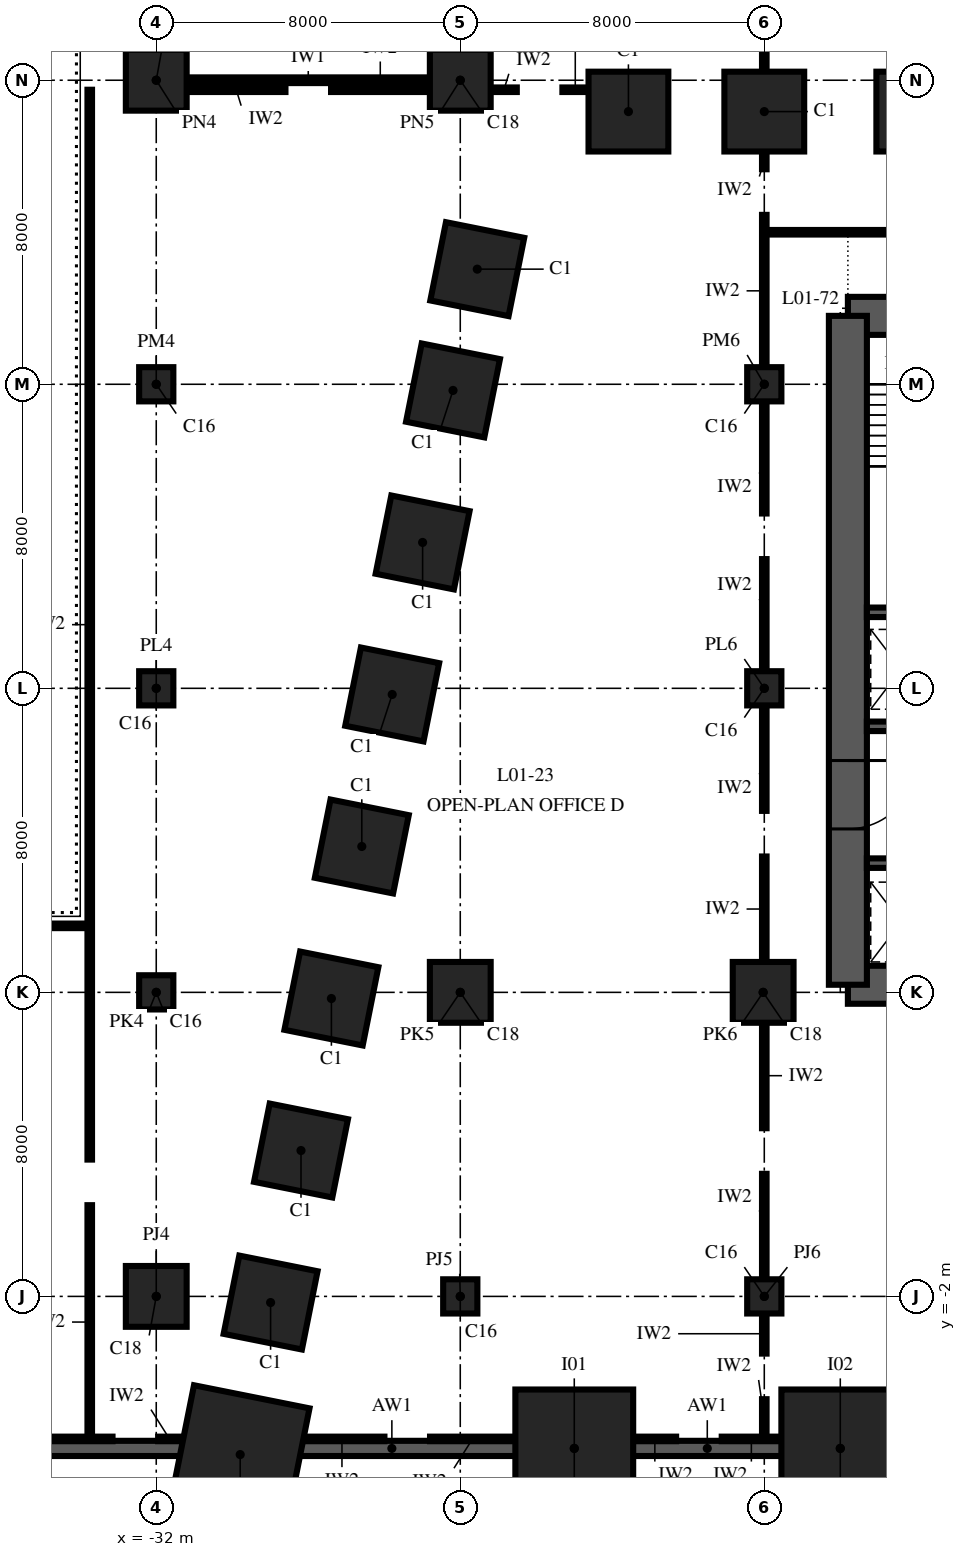
"""IFC4 building model, lengths in metres.
Left out: names, types, materials, properties, quantities, classifications, styles, units other than length and angle.
Written with IfcOpenShell. Run it as: python <this file> out.ifc"""

import sys

from ifc_helpers import new_model, si_unit, direction, frame, frame_2d, origin, origin_2d, place, context, subcontext, project, spatial, polyline, rectangle, outline, extrude, element, fill, save


model = new_model("IFC4")
c1 = context("Model", 3, precision=1e-05, world=origin(), true_north=direction((0.0, 1.0)))
c2 = subcontext(c1, "Body", "Model", "MODEL_VIEW")
j1 = project(units=[si_unit("LENGTHUNIT", "METRE"), si_unit("PLANEANGLEUNIT", "RADIAN")], contexts=[c1])
p1 = place(None, origin())
s1 = spatial("IfcSite", under=j1, at=p1, CompositionType="ELEMENT")
p2 = place(p1, origin())
s2 = spatial("IfcBuilding", under=s1, at=p2, CompositionType="ELEMENT")
p3 = place(p2, frame((0.0, 0.0, 6.0)))
s3 = spatial("IfcBuildingStorey", under=s2, at=p3, CompositionType="ELEMENT", Elevation=6.0)
for number, where, z_axis, x_axis in (
    (1, (-12.0, 29.175, 0.0), (0.0, 0.0, 1.0), (-1.0, 0.0, 0.0)),
    (2, (-16.0, 29.175, 0.0), (0.0, 0.0, 1.0), (-1.0, 0.0, 0.0)),
    (3, (-19.575, 29.175, 0.0), (0.0, 0.0, 1.0), (-1.0, 0.0, 0.0)),
    (4, (-23.553, 25.029, 0.0), (0.0, 0.0, 1.0), (-0.196, -0.981, 0.0)),
    (5, (-24.191, 21.838, 0.0), (0.0, 0.0, 1.0), (-0.196, -0.981, 0.0)),
    (6, (-24.991, 17.838, 0.0), (0.0, 0.0, 1.0), (-0.196, -0.981, 0.0)),
    (7, (-25.791, 13.838, 0.0), (0.0, 0.0, 1.0), (-0.196, -0.981, 0.0)),
    (8, (-26.591, 9.838, 0.0), (0.0, 0.0, 1.0), (-0.196, -0.981, 0.0)),
    (9, (-27.391, 5.838, 0.0), (0.0, 0.0, 1.0), (-0.196, -0.981, 0.0)),
    (10, (-28.191, 1.838, 0.0), (0.0, 0.0, 1.0), (-0.196, -0.981, 0.0)),
    (11, (-28.991, -2.162, 0.0), (0.0, 0.0, 1.0), (-0.196, -0.981, 0.0)),
):
    element("IfcColumn", number, at=place(p3, frame(where, z_axis=z_axis, x_axis=x_axis)), inside=s3, PredefinedType="COLUMN", context=c2, shape_type="SweptSolid", body=[
        extrude(rectangle(XDim=2.1, YDim=2.1, at=origin_2d()), origin(), (0.0, 0.0, 1.0), 6.0),
    ])
for number, where, z_axis, x_axis in (
    (12, (-29.791, -6.162, 0.0), (0.0, 0.0, 1.0), (-0.196, -0.981, 0.0)),
    (13, (-21.0, -6.0, 0.0), (0.0, 0.0, 1.0), (1.0, 0.0, 0.0)),
    (14, (-14.0, -6.0, 0.0), (0.0, 0.0, 1.0), (1.0, 0.0, 0.0)),
):
    element("IfcColumn", number, at=place(p3, frame(where, z_axis=z_axis, x_axis=x_axis)), inside=s3, PredefinedType="COLUMN", context=c2, shape_type="SweptSolid", body=[
        extrude(rectangle(XDim=3.1, YDim=3.1, at=origin_2d()), origin(), (0.0, 0.0, 1.0), 6.0),
    ])
p4 = place(p3, frame((-32.0, -2.0, 0.0), z_axis=(0.0, 0.0, 1.0), x_axis=(1.0, 0.0, 0.0)))
e15 = element("IfcColumn", 15, at=p4, inside=s3, PredefinedType="COLUMN", context=c2, shape_type="SweptSolid", body=[
    extrude(rectangle(XDim=1.6, YDim=1.6, at=origin_2d()), origin(), (0.0, 0.0, 1.0), 6.0),
])
for number, where, z_axis, x_axis in (
    (16, (-32.0, 6.0, 0.0), (0.0, 0.0, 1.0), (1.0, 0.0, 0.0)),
    (17, (-32.0, 14.0, 0.0), (0.0, 0.0, 1.0), (1.0, 0.0, 0.0)),
    (18, (-32.0, 22.0, 0.0), (0.0, 0.0, 1.0), (1.0, 0.0, 0.0)),
):
    element("IfcColumn", number, at=place(p3, frame(where, z_axis=z_axis, x_axis=x_axis)), inside=s3, PredefinedType="COLUMN", context=c2, shape_type="SweptSolid", body=[
        extrude(rectangle(XDim=0.9, YDim=0.9, at=origin_2d()), origin(), (0.0, 0.0, 1.0), 6.0),
    ])
p5 = place(p3, frame((-32.0, 30.0, 0.0), z_axis=(0.0, 0.0, 1.0), x_axis=(1.0, 0.0, 0.0)))
e19 = element("IfcColumn", 19, at=p5, inside=s3, PredefinedType="COLUMN", context=c2, shape_type="SweptSolid", body=[
    extrude(rectangle(XDim=1.6, YDim=1.6, at=origin_2d()), origin(), (0.0, 0.0, 1.0), 6.0),
])
p6 = place(p3, frame((-24.0, -2.0, 0.0), z_axis=(0.0, 0.0, 1.0), x_axis=(1.0, 0.0, 0.0)))
e20 = element("IfcColumn", 20, at=p6, inside=s3, PredefinedType="COLUMN", context=c2, shape_type="SweptSolid", body=[
    extrude(rectangle(XDim=0.9, YDim=0.9, at=origin_2d()), origin(), (0.0, 0.0, 1.0), 6.0),
])
for number, where, z_axis, x_axis in (
    (21, (-24.0, 6.0, 0.0), (0.0, 0.0, 1.0), (1.0, 0.0, 0.0)),
    (22, (-24.0, 30.0, 0.0), (0.0, 0.0, 1.0), (1.0, 0.0, 0.0)),
):
    element("IfcColumn", number, at=place(p3, frame(where, z_axis=z_axis, x_axis=x_axis)), inside=s3, PredefinedType="COLUMN", context=c2, shape_type="SweptSolid", body=[
        extrude(rectangle(XDim=1.6, YDim=1.6, at=origin_2d()), origin(), (0.0, 0.0, 1.0), 6.0),
    ])
p7 = place(p3, frame((-16.0, -2.0, 0.0), z_axis=(0.0, 0.0, 1.0), x_axis=(1.0, 0.0, 0.0)))
e23 = element("IfcColumn", 23, at=p7, inside=s3, PredefinedType="COLUMN", context=c2, shape_type="SweptSolid", body=[
    extrude(rectangle(XDim=0.9, YDim=0.9, at=origin_2d()), origin(), (0.0, 0.0, 1.0), 6.0),
])
p8 = place(p3, frame((-16.03, 6.0, 0.0), z_axis=(0.0, 0.0, 1.0), x_axis=(1.0, 0.0, 0.0)))
e24 = element("IfcColumn", 24, at=p8, inside=s3, PredefinedType="COLUMN", context=c2, shape_type="SweptSolid", body=[
    extrude(rectangle(XDim=1.6, YDim=1.6, at=origin_2d()), origin(), (0.0, 0.0, 1.0), 6.0),
])
for number, where, z_axis, x_axis in (
    (25, (-16.0, 14.0, 0.0), (0.0, 0.0, 1.0), (1.0, 0.0, 0.0)),
    (26, (-16.0, 22.0, 0.0), (0.0, 0.0, 1.0), (1.0, 0.0, 0.0)),
):
    element("IfcColumn", number, at=place(p3, frame(where, z_axis=z_axis, x_axis=x_axis)), inside=s3, PredefinedType="COLUMN", context=c2, shape_type="SweptSolid", body=[
        extrude(rectangle(XDim=0.9, YDim=0.9, at=origin_2d()), origin(), (0.0, 0.0, 1.0), 6.0),
    ])
p9 = place(p3, frame((-13.8, 6.2, 0.0), z_axis=(0.0, 0.0, 1.0), x_axis=(1.0, 0.0, 0.0)))
e27 = element("IfcWall", 27, at=p9, inside=s3, PredefinedType="SHEAR", context=c2, shape_type="SweptSolid", body=[
    extrude(rectangle(XDim=27.6, YDim=1.0, at=frame_2d((13.8, 0.0))), origin(), (0.0, 0.0, 1.0), 6.0),
])
p10 = place(p3, frame((13.8, 23.8, 0.0), z_axis=(0.0, 0.0, 1.0), x_axis=(-1.0, 0.0, 0.0)))
e28 = element("IfcWall", 28, at=p10, inside=s3, PredefinedType="SHEAR", context=c2, shape_type="SweptSolid", body=[
    extrude(rectangle(XDim=27.6, YDim=1.0, at=frame_2d((13.8, 0.0))), origin(), (0.0, 0.0, 1.0), 6.0),
])
p11 = place(p10, frame((21.7, 0.0, 0.0)))
e29 = element("IfcOpeningElement", 29, at=p11, cuts=e28, PredefinedType="OPENING", context=c2, shape_type="SweptSolid", body=[
    extrude(rectangle(XDim=1.0, YDim=2.1, at=frame_2d((0.5, 1.05))), frame((0.0, 0.515, 0.0), z_axis=(0.0, -1.0, 0.0), x_axis=(1.0, 0.0, 0.0)), (0.0, 0.0, 1.0), 1.03),
])
p12 = place(p10, frame((4.9, 0.0, 0.0)))
e30 = element("IfcOpeningElement", 30, at=p12, cuts=e28, PredefinedType="OPENING", context=c2, shape_type="SweptSolid", body=[
    extrude(rectangle(XDim=1.0, YDim=2.1, at=frame_2d((0.5, 1.05))), frame((0.0, 0.515, 0.0), z_axis=(0.0, -1.0, 0.0), x_axis=(1.0, 0.0, 0.0)), (0.0, 0.0, 1.0), 1.03),
])
p13 = place(p10, frame((17.3, 0.0, 0.0)))
e31 = element("IfcOpeningElement", 31, at=p13, cuts=e28, PredefinedType="OPENING", context=c2, shape_type="SweptSolid", body=[
    extrude(rectangle(XDim=1.0, YDim=2.1, at=frame_2d((0.5, 1.05))), frame((0.0, 0.515, 0.0), z_axis=(0.0, -1.0, 0.0), x_axis=(1.0, 0.0, 0.0)), (0.0, 0.0, 1.0), 1.03),
])
p14 = place(p10, frame((13.3, 0.0, 0.0)))
e32 = element("IfcOpeningElement", 32, at=p14, cuts=e28, PredefinedType="OPENING", context=c2, shape_type="SweptSolid", body=[
    extrude(rectangle(XDim=1.0, YDim=2.1, at=frame_2d((0.5, 1.05))), frame((0.0, 0.515, 0.0), z_axis=(0.0, -1.0, 0.0), x_axis=(1.0, 0.0, 0.0)), (0.0, 0.0, 1.0), 1.03),
])
p15 = place(p10, frame((9.3, 0.0, 0.0)))
e33 = element("IfcOpeningElement", 33, at=p15, cuts=e28, PredefinedType="OPENING", context=c2, shape_type="SweptSolid", body=[
    extrude(rectangle(XDim=1.0, YDim=2.1, at=frame_2d((0.5, 1.05))), frame((0.0, 0.515, 0.0), z_axis=(0.0, -1.0, 0.0), x_axis=(1.0, 0.0, 0.0)), (0.0, 0.0, 1.0), 1.03),
])
p16 = place(p3, frame((-13.8, 23.8, 0.0), z_axis=(0.0, 0.0, 1.0), x_axis=(0.0, -1.0, 0.0)))
e34 = element("IfcWall", 34, at=p16, inside=s3, PredefinedType="SHEAR", context=c2, shape_type="SweptSolid", body=[
    extrude(outline(polyline([(0.0, -0.5), (17.6, -0.5), (17.6, 0.0), (17.1, 0.0), (17.1, 0.5), (0.5, 0.5), (0.5, 0.0), (0.0, 0.0), (0.0, -0.5)])), origin(), (0.0, 0.0, 1.0), 6.0),
])
p17 = place(p16, frame((11.7, 0.0, 0.0)))
e35 = element("IfcOpeningElement", 35, at=p17, cuts=e34, PredefinedType="OPENING", context=c2, shape_type="SweptSolid", body=[
    extrude(rectangle(XDim=1.8, YDim=2.4, at=frame_2d((0.9, 1.2))), frame((0.0, 0.515, 0.0), z_axis=(0.0, -1.0, 0.0), x_axis=(1.0, 0.0, 0.0)), (0.0, 0.0, 1.0), 1.03),
])
p18 = place(p3, frame((-13.3, 9.4, 0.0), z_axis=(0.0, 0.0, 1.0), x_axis=(1.0, 0.0, 0.0)))
e36 = element("IfcWall", 36, at=p18, inside=s3, PredefinedType="SHEAR", context=c2, shape_type="SweptSolid", body=[
    extrude(rectangle(XDim=26.6, YDim=0.25, at=frame_2d((13.3, 0.0))), origin(), (0.0, 0.0, 1.0), 6.0),
])
p19 = place(p3, frame((-13.3, 13.0, 0.0), z_axis=(0.0, 0.0, 1.0), x_axis=(1.0, 0.0, 0.0)))
e37 = element("IfcWall", 37, at=p19, inside=s3, PredefinedType="SHEAR", context=c2, shape_type="SweptSolid", body=[
    extrude(rectangle(XDim=26.6, YDim=0.25, at=frame_2d((13.3, 0.0))), origin(), (0.0, 0.0, 1.0), 6.0),
])
p20 = place(p19, frame((16.45, 0.0, 0.0)))
e38 = element("IfcOpeningElement", 38, at=p20, cuts=e37, PredefinedType="OPENING", context=c2, shape_type="SweptSolid", body=[
    extrude(rectangle(XDim=0.9, YDim=2.1, at=frame_2d((0.45, 1.05))), frame((0.0, 0.14, 0.0), z_axis=(0.0, -1.0, 0.0), x_axis=(1.0, 0.0, 0.0)), (0.0, 0.0, 1.0), 0.28),
])
p21 = place(p19, frame((19.65, 0.0, 0.0)))
e39 = element("IfcOpeningElement", 39, at=p21, cuts=e37, PredefinedType="OPENING", context=c2, shape_type="SweptSolid", body=[
    extrude(rectangle(XDim=0.9, YDim=2.1, at=frame_2d((0.45, 1.05))), frame((0.0, 0.14, 0.0), z_axis=(0.0, -1.0, 0.0), x_axis=(1.0, 0.0, 0.0)), (0.0, 0.0, 1.0), 0.28),
])
p22 = place(p19, frame((21.65, 0.0, 0.0)))
e40 = element("IfcOpeningElement", 40, at=p22, cuts=e37, PredefinedType="OPENING", context=c2, shape_type="SweptSolid", body=[
    extrude(rectangle(XDim=0.9, YDim=2.1, at=frame_2d((0.45, 1.05))), frame((0.0, 0.14, 0.0), z_axis=(0.0, -1.0, 0.0), x_axis=(1.0, 0.0, 0.0)), (0.0, 0.0, 1.0), 0.28),
])
p23 = place(p3, frame((-13.3, 16.0, 0.0), z_axis=(0.0, 0.0, 1.0), x_axis=(1.0, 0.0, 0.0)))
e41 = element("IfcWall", 41, at=p23, inside=s3, PredefinedType="SHEAR", context=c2, shape_type="SweptSolid", body=[
    extrude(rectangle(XDim=26.6, YDim=0.25, at=frame_2d((13.3, 0.0))), origin(), (0.0, 0.0, 1.0), 6.0),
])
p24 = place(p3, frame((-48.3, -6.0, 0.0), z_axis=(0.0, 0.0, 1.0), x_axis=(1.0, 0.0, 0.0)))
e42 = element("IfcWall", 42, at=p24, inside=s3, PredefinedType="SHEAR", context=c2, shape_type="SweptSolid", body=[
    extrude(rectangle(XDim=17.05, YDim=0.4, at=frame_2d((8.525, 0.0))), origin(), (0.0, 0.0, 1.0), 6.0),
])
p25 = place(p3, frame((-29.95, -6.0, 0.0), z_axis=(0.0, 0.0, 1.0), x_axis=(1.0, 0.0, 0.0)))
e43 = element("IfcWall", 43, at=p25, inside=s3, PredefinedType="SHEAR", context=c2, shape_type="SweptSolid", body=[
    extrude(rectangle(XDim=8.3, YDim=0.4, at=frame_2d((4.15, 0.0))), origin(), (0.0, 0.0, 1.0), 6.0),
])
for number, where, z_axis, x_axis in (
    (44, (-20.35, -6.0, 0.0), (0.0, 0.0, 1.0), (1.0, 0.0, 0.0)),
    (45, (-13.35, -6.0, 0.0), (0.0, 0.0, 1.0), (1.0, 0.0, 0.0)),
):
    element("IfcWall", number, at=place(p3, frame(where, z_axis=z_axis, x_axis=x_axis)), inside=s3, PredefinedType="SHEAR", context=c2, shape_type="SweptSolid", body=[
        extrude(rectangle(XDim=5.7, YDim=0.4, at=frame_2d((2.85, 0.0))), origin(), (0.0, 0.0, 1.0), 6.0),
    ])
p26 = place(p3, frame((-33.75, -5.75, 0.0), z_axis=(0.0, 0.0, 1.0), x_axis=(0.0, 1.0, 0.0)))
e46 = element("IfcWall", 46, at=p26, inside=s3, PredefinedType="PARTITIONING", context=c2, shape_type="SweptSolid", body=[
    extrude(rectangle(XDim=6.15, YDim=0.12, at=frame_2d((3.075, 0.0))), origin(), (0.0, 0.0, 1.0), 5.7),
])
p27 = place(p3, frame((-33.75, 1.6, 0.0), z_axis=(0.0, 0.0, 1.0), x_axis=(0.0, 1.0, 0.0)))
e47 = element("IfcWall", 47, at=p27, inside=s3, PredefinedType="PARTITIONING", context=c2, shape_type="SweptSolid", body=[
    extrude(rectangle(XDim=28.15, YDim=0.12, at=frame_2d((14.075, 0.0))), origin(), (0.0, 0.0, 1.0), 5.7),
])
for number, where, z_axis, x_axis in (
    (48, (-16.0, -5.75, 0.0), (0.0, 0.0, 1.0), (0.0, 1.0, 0.0)),
    (49, (-16.0, -3.505, 0.0), (0.0, 0.0, 1.0), (0.0, 1.0, 0.0)),
):
    element("IfcWall", number, at=place(p3, frame(where, z_axis=z_axis, x_axis=x_axis)), inside=s3, PredefinedType="PARTITIONING", context=c2, shape_type="SweptSolid", body=[
        extrude(rectangle(XDim=1.045, YDim=0.12, at=frame_2d((0.522, 0.0))), origin(), (0.0, 0.0, 1.0), 5.7),
    ])
p28 = place(p3, frame((-16.0, -1.54, 0.0), z_axis=(0.0, 0.0, 1.0), x_axis=(0.0, 1.0, 0.0)))
e50 = element("IfcWall", 50, at=p28, inside=s3, PredefinedType="PARTITIONING", context=c2, shape_type="SweptSolid", body=[
    extrude(rectangle(XDim=2.765, YDim=0.12, at=frame_2d((1.383, 0.0))), origin(), (0.0, 0.0, 1.0), 5.05),
])
for number, where, z_axis, x_axis in (
    (51, (-16.0, 2.425, 0.0), (0.0, 0.0, 1.0), (0.0, 1.0, 0.0)),
    (52, (-16.0, 6.81, 0.0), (0.0, 0.0, 1.0), (0.0, 1.0, 0.0)),
):
    element("IfcWall", number, at=place(p3, frame(where, z_axis=z_axis, x_axis=x_axis)), inside=s3, PredefinedType="PARTITIONING", context=c2, shape_type="SweptSolid", body=[
        extrude(rectangle(XDim=2.765, YDim=0.12, at=frame_2d((1.382, 0.0))), origin(), (0.0, 0.0, 1.0), 5.05),
    ])
p29 = place(p3, frame((-16.0, 10.775, 0.0), z_axis=(0.0, 0.0, 1.0), x_axis=(0.0, 1.0, 0.0)))
e53 = element("IfcWall", 53, at=p29, inside=s3, PredefinedType="PARTITIONING", context=c2, shape_type="SweptSolid", body=[
    extrude(rectangle(XDim=2.765, YDim=0.12, at=frame_2d((1.383, 0.0))), origin(), (0.0, 0.0, 1.0), 5.05),
])
for number, where, z_axis, x_axis in (
    (54, (-16.0, 14.46, 0.0), (0.0, 0.0, 1.0), (0.0, 1.0, 0.0)),
    (55, (-16.0, 18.6, 0.0), (0.0, 0.0, 1.0), (0.0, 1.0, 0.0)),
):
    element("IfcWall", number, at=place(p3, frame(where, z_axis=z_axis, x_axis=x_axis)), inside=s3, PredefinedType="PARTITIONING", context=c2, shape_type="SweptSolid", body=[
        extrude(rectangle(XDim=2.94, YDim=0.12, at=frame_2d((1.47, 0.0))), origin(), (0.0, 0.0, 1.0), 5.05),
    ])
p30 = place(p3, frame((-16.0, 22.46, 0.0), z_axis=(0.0, 0.0, 1.0), x_axis=(0.0, 1.0, 0.0)))
e56 = element("IfcWall", 56, at=p30, inside=s3, PredefinedType="PARTITIONING", context=c2, shape_type="SweptSolid", body=[
    extrude(rectangle(XDim=3.998, YDim=0.12, at=frame_2d((1.999, 0.0))), origin(), (0.0, 0.0, 1.0), 5.7),
])
p31 = place(p3, frame((-16.0, 27.657, 0.0), z_axis=(0.0, 0.0, 1.0), x_axis=(0.0, 1.0, 0.0)))
e57 = element("IfcWall", 57, at=p31, inside=s3, PredefinedType="PARTITIONING", context=c2, shape_type="SweptSolid", body=[
    extrude(rectangle(XDim=0.458, YDim=0.12, at=frame_2d((0.229, 0.0))), origin(), (0.0, 0.0, 1.0), 5.7),
])
p32 = place(p3, frame((-16.0, 30.235, 0.0), z_axis=(0.0, 0.0, 1.0), x_axis=(0.0, 1.0, 0.0)))
e58 = element("IfcWall", 58, at=p32, inside=s3, PredefinedType="PARTITIONING", context=c2, shape_type="SweptSolid", body=[
    extrude(rectangle(XDim=3.052, YDim=0.12, at=frame_2d((1.526, 0.0))), origin(), (0.0, 0.0, 1.0), 5.7),
])
p33 = place(p3, frame((-55.75, -5.75, 0.0), z_axis=(0.0, 0.0, 1.0), x_axis=(1.0, 0.0, 0.0)))
e59 = element("IfcWall", 59, at=p33, inside=s3, PredefinedType="PARTITIONING", context=c2, shape_type="SweptSolid", body=[
    extrude(rectangle(XDim=22.6, YDim=0.12, at=frame_2d((11.3, 0.0))), origin(), (0.0, 0.0, 1.0), 5.7),
])
p34 = place(p3, frame((-31.95, -5.75, 0.0), z_axis=(0.0, 0.0, 1.0), x_axis=(1.0, 0.0, 0.0)))
e60 = element("IfcWall", 60, at=p34, inside=s3, PredefinedType="PARTITIONING", context=c2, shape_type="SweptSolid", body=[
    extrude(rectangle(XDim=0.599, YDim=0.12, at=frame_2d((0.3, 0.0))), origin(), (0.0, 0.0, 1.0), 5.7),
])
for number, where, z_axis, x_axis in (
    (61, (-28.231, -5.75, 0.0), (0.0, 0.0, 1.0), (1.0, 0.0, 0.0)),
    (62, (-24.795, -5.75, 0.0), (0.0, 0.0, 1.0), (1.0, 0.0, 0.0)),
):
    element("IfcWall", number, at=place(p3, frame(where, z_axis=z_axis, x_axis=x_axis)), inside=s3, PredefinedType="PARTITIONING", context=c2, shape_type="SweptSolid", body=[
        extrude(rectangle(XDim=2.235, YDim=0.12, at=frame_2d((1.118, 0.0))), origin(), (0.0, 0.0, 1.0), 5.7),
    ])
p35 = place(p3, frame((-19.44, -5.75, 0.0), z_axis=(0.0, 0.0, 1.0), x_axis=(1.0, 0.0, 0.0)))
e63 = element("IfcWall", 63, at=p35, inside=s3, PredefinedType="PARTITIONING", context=c2, shape_type="SweptSolid", body=[
    extrude(rectangle(XDim=1.12, YDim=0.12, at=frame_2d((0.56, 0.0))), origin(), (0.0, 0.0, 1.0), 5.7),
])
p36 = place(p3, frame((-17.12, -5.75, 0.0), z_axis=(0.0, 0.0, 1.0), x_axis=(1.0, 0.0, 0.0)))
e64 = element("IfcWall", 64, at=p36, inside=s3, PredefinedType="PARTITIONING", context=c2, shape_type="SweptSolid", body=[
    extrude(rectangle(XDim=1.56, YDim=0.12, at=frame_2d((0.78, 0.0))), origin(), (0.0, 0.0, 1.0), 5.7),
])
p37 = place(p3, frame((-44.15, 7.75, 0.0), z_axis=(0.0, 0.0, 1.0), x_axis=(1.0, 0.0, 0.0)))
e65 = element("IfcWall", 65, at=p37, inside=s3, PredefinedType="PARTITIONING", context=c2, shape_type="SweptSolid", body=[
    extrude(rectangle(XDim=10.4, YDim=0.12, at=frame_2d((5.2, 0.0))), origin(), (0.0, 0.0, 1.0), 5.7),
])
p38 = place(p3, frame((-16.0, 26.0, 0.0), z_axis=(0.0, 0.0, 1.0), x_axis=(1.0, 0.0, 0.0)))
e66 = element("IfcWall", 66, at=p38, inside=s3, PredefinedType="PARTITIONING", context=c2, shape_type="SweptSolid", body=[
    extrude(rectangle(XDim=15.4, YDim=0.12, at=frame_2d((7.7, 0.0))), origin(), (0.0, 0.0, 1.0), 5.7),
])
for number, where, z_axis, x_axis in (
    (67, (-31.19, 29.75, 0.0), (0.0, 0.0, 1.0), (1.0, 0.0, 0.0)),
    (68, (-27.4, 29.75, 0.0), (0.0, 0.0, 1.0), (1.0, 0.0, 0.0)),
):
    element("IfcWall", number, at=place(p3, frame(where, z_axis=z_axis, x_axis=x_axis)), inside=s3, PredefinedType="PARTITIONING", context=c2, shape_type="SweptSolid", body=[
        extrude(rectangle(XDim=2.59, YDim=0.12, at=frame_2d((1.295, 0.0))), origin(), (0.0, 0.0, 1.0), 5.05),
    ])
for number, where, z_axis, x_axis in (
    (69, (-23.19, 29.75, 0.0), (0.0, 0.0, 1.0), (1.0, 0.0, 0.0)),
    (70, (-21.312, 29.75, 0.0), (0.0, 0.0, 1.0), (1.0, 0.0, 0.0)),
):
    element("IfcWall", number, at=place(p3, frame(where, z_axis=z_axis, x_axis=x_axis)), inside=s3, PredefinedType="PARTITIONING", context=c2, shape_type="SweptSolid", body=[
        extrude(rectangle(XDim=0.677, YDim=0.12, at=frame_2d((0.339, 0.0))), origin(), (0.0, 0.0, 1.0), 5.7),
    ])
p39 = place(p3, frame((-31.19, 30.0, 0.0), z_axis=(0.0, 0.0, 1.0), x_axis=(1.0, 0.0, 0.0)))
e71 = element("IfcWall", 71, at=p39, inside=s3, PredefinedType="PARTITIONING", context=c2, shape_type="SweptSolid", body=[
    extrude(rectangle(XDim=6.38, YDim=0.15, at=frame_2d((3.19, 0.0))), origin(), (0.0, 0.0, 1.0), 5.05),
])
p40 = place(p17, origin())
e72 = element("IfcDoor", 72, at=p40, inside=s3, OperationType="DOUBLE_DOOR_SINGLE_SWING", PredefinedType="DOOR", context=c2, shape_type="SweptSolid", body=[
    extrude(rectangle(XDim=1.8, YDim=2.4, at=frame_2d((0.9, 1.2))), frame((0.0, 0.5, 0.0), z_axis=(0.0, -1.0, 0.0), x_axis=(1.0, 0.0, 0.0)), (0.0, 0.0, 1.0), 1.0),
])
fill(e35, e72)
save(model, sys.argv[1])
